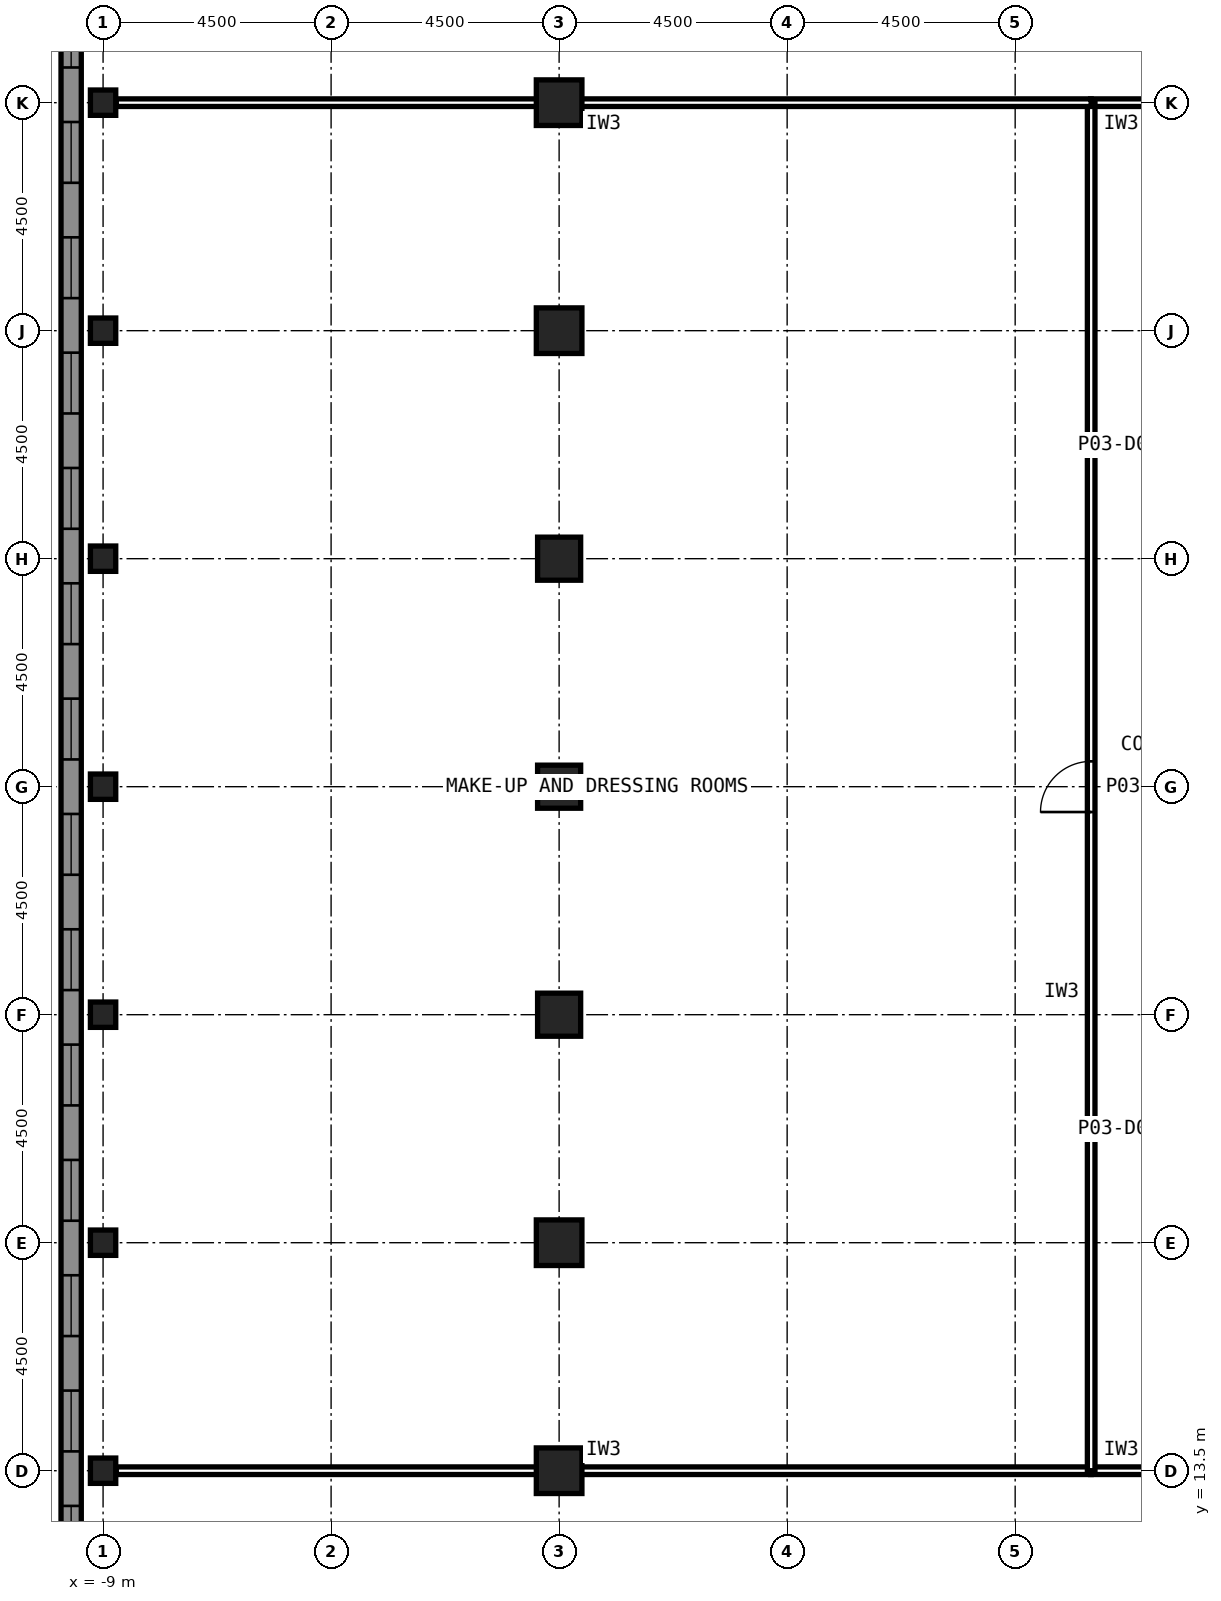
"""IFC4 building model, lengths in metres.
Left out: names, types, materials, properties, quantities, classifications, styles, units other than length and angle.
Written with IfcOpenShell. Run it as: python <this file> out.ifc"""

import sys

from ifc_helpers import new_model, si_unit, direction, frame, frame_2d, origin, origin_2d, place, context, subcontext, project, spatial, rectangle, hollow_rectangle, extrude, element, fill, save


model = new_model("IFC4")
c1 = context("Model", 3, precision=1e-05, world=origin(), true_north=direction((0.0, 1.0)))
c2 = subcontext(c1, "Body", "Model", "MODEL_VIEW")
j1 = project(units=[si_unit("LENGTHUNIT", "METRE"), si_unit("PLANEANGLEUNIT", "RADIAN")], contexts=[c1])
p1 = place(None, origin())
s1 = spatial("IfcSite", under=j1, at=p1, CompositionType="ELEMENT")
p2 = place(p1, origin())
s2 = spatial("IfcBuilding", under=s1, at=p2, CompositionType="ELEMENT")
p3 = place(p2, frame((0.0, 0.0, 12.0)))
s3 = spatial("IfcBuildingStorey", under=s2, at=p3, CompositionType="ELEMENT", Elevation=12.0)
for number, where, z_axis, x_axis in (
    (1, (0.0, 40.5, 0.0), (0.0, 0.0, 1.0), (1.0, 0.0, 0.0)),
    (2, (0.0, 36.0, 0.0), (0.0, 0.0, 1.0), (1.0, 0.0, 0.0)),
):
    element("IfcColumn", number, at=place(p3, frame(where, z_axis=z_axis, x_axis=x_axis)), inside=s3, PredefinedType="COLUMN", context=c2, shape_type="SweptSolid", body=[
        extrude(hollow_rectangle(XDim=0.9, YDim=0.9, WallThickness=0.063, at=origin_2d()), origin(), (0.0, 0.0, 1.0), 6.0),
    ])
for number, where, z_axis, x_axis in (
    (3, (0.0, 31.5, 0.0), (0.0, 0.0, 1.0), (1.0, 0.0, 0.0)),
    (4, (0.0, 27.0, 0.0), (0.0, 0.0, 1.0), (1.0, 0.0, 0.0)),
    (5, (0.0, 22.5, 0.0), (0.0, 0.0, 1.0), (1.0, 0.0, 0.0)),
):
    element("IfcColumn", number, at=place(p3, frame(where, z_axis=z_axis, x_axis=x_axis)), inside=s3, PredefinedType="COLUMN", context=c2, shape_type="SweptSolid", body=[
        extrude(hollow_rectangle(XDim=0.85, YDim=0.85, WallThickness=0.05, at=origin_2d()), origin(), (0.0, 0.0, 1.0), 6.0),
    ])
for number, where, z_axis, x_axis in (
    (6, (0.0, 18.0, 0.0), (0.0, 0.0, 1.0), (1.0, 0.0, 0.0)),
    (7, (0.0, 13.5, 0.0), (0.0, 0.0, 1.0), (1.0, 0.0, 0.0)),
):
    element("IfcColumn", number, at=place(p3, frame(where, z_axis=z_axis, x_axis=x_axis)), inside=s3, PredefinedType="COLUMN", context=c2, shape_type="SweptSolid", body=[
        extrude(hollow_rectangle(XDim=0.9, YDim=0.9, WallThickness=0.063, at=origin_2d()), origin(), (0.0, 0.0, 1.0), 6.0),
    ])
for number, where, z_axis, x_axis in (
    (8, (-9.0, 13.5, 0.0), (0.0, 0.0, 1.0), (1.0, 0.0, 0.0)),
    (9, (-9.0, 18.0, 0.0), (0.0, 0.0, 1.0), (1.0, 0.0, 0.0)),
    (10, (-9.0, 22.5, 0.0), (0.0, 0.0, 1.0), (1.0, 0.0, 0.0)),
    (11, (-9.0, 27.0, 0.0), (0.0, 0.0, 1.0), (1.0, 0.0, 0.0)),
    (12, (-9.0, 31.5, 0.0), (0.0, 0.0, 1.0), (1.0, 0.0, 0.0)),
    (13, (-9.0, 36.0, 0.0), (0.0, 0.0, 1.0), (1.0, 0.0, 0.0)),
    (14, (-9.0, 40.5, 0.0), (0.0, 0.0, 1.0), (1.0, 0.0, 0.0)),
):
    element("IfcColumn", number, at=place(p3, frame(where, z_axis=z_axis, x_axis=x_axis)), inside=s3, PredefinedType="COLUMN", context=c2, shape_type="SweptSolid", body=[
        extrude(hollow_rectangle(XDim=0.5, YDim=0.5, WallThickness=0.022, at=origin_2d()), origin(), (0.0, 0.0, 1.0), 6.0),
    ])
p4 = place(p3, frame((-9.63, 4.239, 0.0), z_axis=(0.0, 0.0, 1.0), x_axis=(0.0, 1.0, 0.0)))
e15 = element("IfcWall", 15, at=p4, inside=s3, PredefinedType="SOLIDWALL", context=c2, shape_type="SweptSolid", body=[
    extrude(rectangle(XDim=45.522, YDim=0.4, at=frame_2d((22.761, 0.0))), origin(), (0.0, 0.0, 1.0), 6.0),
])
p5 = place(p4, frame((0.538, 0.0, 0.9)))
e16 = element("IfcOpeningElement", 16, at=p5, cuts=e15, PredefinedType="OPENING", context=c2, shape_type="SweptSolid", body=[
    extrude(rectangle(XDim=1.2, YDim=1.5, at=frame_2d((0.6, 0.75))), frame((0.0, 0.21, 0.0), z_axis=(0.0, -1.0, 0.0), x_axis=(1.0, 0.0, 0.0)), (0.0, 0.0, 1.0), 0.42),
])
p6 = place(p4, frame((2.814, 0.0, 0.9)))
e17 = element("IfcOpeningElement", 17, at=p6, cuts=e15, PredefinedType="OPENING", context=c2, shape_type="SweptSolid", body=[
    extrude(rectangle(XDim=1.2, YDim=1.5, at=frame_2d((0.6, 0.75))), frame((0.0, 0.21, 0.0), z_axis=(0.0, -1.0, 0.0), x_axis=(1.0, 0.0, 0.0)), (0.0, 0.0, 1.0), 0.42),
])
p7 = place(p4, frame((5.09, 0.0, 0.9)))
e18 = element("IfcOpeningElement", 18, at=p7, cuts=e15, PredefinedType="OPENING", context=c2, shape_type="SweptSolid", body=[
    extrude(rectangle(XDim=1.2, YDim=1.5, at=frame_2d((0.6, 0.75))), frame((0.0, 0.21, 0.0), z_axis=(0.0, -1.0, 0.0), x_axis=(1.0, 0.0, 0.0)), (0.0, 0.0, 1.0), 0.42),
])
p8 = place(p4, frame((7.366, 0.0, 0.9)))
e19 = element("IfcOpeningElement", 19, at=p8, cuts=e15, PredefinedType="OPENING", context=c2, shape_type="SweptSolid", body=[
    extrude(rectangle(XDim=1.2, YDim=1.5, at=frame_2d((0.6, 0.75))), frame((0.0, 0.21, 0.0), z_axis=(0.0, -1.0, 0.0), x_axis=(1.0, 0.0, 0.0)), (0.0, 0.0, 1.0), 0.42),
])
p9 = place(p4, frame((9.642, 0.0, 0.9)))
e20 = element("IfcOpeningElement", 20, at=p9, cuts=e15, PredefinedType="OPENING", context=c2, shape_type="SweptSolid", body=[
    extrude(rectangle(XDim=1.2, YDim=1.5, at=frame_2d((0.6, 0.75))), frame((0.0, 0.21, 0.0), z_axis=(0.0, -1.0, 0.0), x_axis=(1.0, 0.0, 0.0)), (0.0, 0.0, 1.0), 0.42),
])
p10 = place(p4, frame((11.918, 0.0, 0.9)))
e21 = element("IfcOpeningElement", 21, at=p10, cuts=e15, PredefinedType="OPENING", context=c2, shape_type="SweptSolid", body=[
    extrude(rectangle(XDim=1.2, YDim=1.5, at=frame_2d((0.6, 0.75))), frame((0.0, 0.21, 0.0), z_axis=(0.0, -1.0, 0.0), x_axis=(1.0, 0.0, 0.0)), (0.0, 0.0, 1.0), 0.42),
])
p11 = place(p4, frame((14.195, 0.0, 0.9)))
e22 = element("IfcOpeningElement", 22, at=p11, cuts=e15, PredefinedType="OPENING", context=c2, shape_type="SweptSolid", body=[
    extrude(rectangle(XDim=1.2, YDim=1.5, at=frame_2d((0.6, 0.75))), frame((0.0, 0.21, 0.0), z_axis=(0.0, -1.0, 0.0), x_axis=(1.0, 0.0, 0.0)), (0.0, 0.0, 1.0), 0.42),
])
p12 = place(p4, frame((16.471, 0.0, 0.9)))
e23 = element("IfcOpeningElement", 23, at=p12, cuts=e15, PredefinedType="OPENING", context=c2, shape_type="SweptSolid", body=[
    extrude(rectangle(XDim=1.2, YDim=1.5, at=frame_2d((0.6, 0.75))), frame((0.0, 0.21, 0.0), z_axis=(0.0, -1.0, 0.0), x_axis=(1.0, 0.0, 0.0)), (0.0, 0.0, 1.0), 0.42),
])
p13 = place(p4, frame((18.747, 0.0, 0.9)))
e24 = element("IfcOpeningElement", 24, at=p13, cuts=e15, PredefinedType="OPENING", context=c2, shape_type="SweptSolid", body=[
    extrude(rectangle(XDim=1.2, YDim=1.5, at=frame_2d((0.6, 0.75))), frame((0.0, 0.21, 0.0), z_axis=(0.0, -1.0, 0.0), x_axis=(1.0, 0.0, 0.0)), (0.0, 0.0, 1.0), 0.42),
])
p14 = place(p4, frame((21.023, 0.0, 0.9)))
e25 = element("IfcOpeningElement", 25, at=p14, cuts=e15, PredefinedType="OPENING", context=c2, shape_type="SweptSolid", body=[
    extrude(rectangle(XDim=1.2, YDim=1.5, at=frame_2d((0.6, 0.75))), frame((0.0, 0.21, 0.0), z_axis=(0.0, -1.0, 0.0), x_axis=(1.0, 0.0, 0.0)), (0.0, 0.0, 1.0), 0.42),
])
p15 = place(p4, frame((23.299, 0.0, 0.9)))
e26 = element("IfcOpeningElement", 26, at=p15, cuts=e15, PredefinedType="OPENING", context=c2, shape_type="SweptSolid", body=[
    extrude(rectangle(XDim=1.2, YDim=1.5, at=frame_2d((0.6, 0.75))), frame((0.0, 0.21, 0.0), z_axis=(0.0, -1.0, 0.0), x_axis=(1.0, 0.0, 0.0)), (0.0, 0.0, 1.0), 0.42),
])
p16 = place(p4, frame((25.575, 0.0, 0.9)))
e27 = element("IfcOpeningElement", 27, at=p16, cuts=e15, PredefinedType="OPENING", context=c2, shape_type="SweptSolid", body=[
    extrude(rectangle(XDim=1.2, YDim=1.5, at=frame_2d((0.6, 0.75))), frame((0.0, 0.21, 0.0), z_axis=(0.0, -1.0, 0.0), x_axis=(1.0, 0.0, 0.0)), (0.0, 0.0, 1.0), 0.42),
])
p17 = place(p4, frame((27.851, 0.0, 0.9)))
e28 = element("IfcOpeningElement", 28, at=p17, cuts=e15, PredefinedType="OPENING", context=c2, shape_type="SweptSolid", body=[
    extrude(rectangle(XDim=1.2, YDim=1.5, at=frame_2d((0.6, 0.75))), frame((0.0, 0.21, 0.0), z_axis=(0.0, -1.0, 0.0), x_axis=(1.0, 0.0, 0.0)), (0.0, 0.0, 1.0), 0.42),
])
p18 = place(p4, frame((30.127, 0.0, 0.9)))
e29 = element("IfcOpeningElement", 29, at=p18, cuts=e15, PredefinedType="OPENING", context=c2, shape_type="SweptSolid", body=[
    extrude(rectangle(XDim=1.2, YDim=1.5, at=frame_2d((0.6, 0.75))), frame((0.0, 0.21, 0.0), z_axis=(0.0, -1.0, 0.0), x_axis=(1.0, 0.0, 0.0)), (0.0, 0.0, 1.0), 0.42),
])
p19 = place(p4, frame((32.404, 0.0, 0.9)))
e30 = element("IfcOpeningElement", 30, at=p19, cuts=e15, PredefinedType="OPENING", context=c2, shape_type="SweptSolid", body=[
    extrude(rectangle(XDim=1.2, YDim=1.5, at=frame_2d((0.6, 0.75))), frame((0.0, 0.21, 0.0), z_axis=(0.0, -1.0, 0.0), x_axis=(1.0, 0.0, 0.0)), (0.0, 0.0, 1.0), 0.42),
])
p20 = place(p4, frame((34.679, 0.0, 0.9)))
e31 = element("IfcOpeningElement", 31, at=p20, cuts=e15, PredefinedType="OPENING", context=c2, shape_type="SweptSolid", body=[
    extrude(rectangle(XDim=1.2, YDim=1.5, at=frame_2d((0.6, 0.75))), frame((0.0, 0.21, 0.0), z_axis=(0.0, -1.0, 0.0), x_axis=(1.0, 0.0, 0.0)), (0.0, 0.0, 1.0), 0.42),
])
p21 = place(p4, frame((36.956, 0.0, 0.9)))
e32 = element("IfcOpeningElement", 32, at=p21, cuts=e15, PredefinedType="OPENING", context=c2, shape_type="SweptSolid", body=[
    extrude(rectangle(XDim=1.2, YDim=1.5, at=frame_2d((0.6, 0.75))), frame((0.0, 0.21, 0.0), z_axis=(0.0, -1.0, 0.0), x_axis=(1.0, 0.0, 0.0)), (0.0, 0.0, 1.0), 0.42),
])
p22 = place(p4, frame((39.232, 0.0, 0.9)))
e33 = element("IfcOpeningElement", 33, at=p22, cuts=e15, PredefinedType="OPENING", context=c2, shape_type="SweptSolid", body=[
    extrude(rectangle(XDim=1.2, YDim=1.5, at=frame_2d((0.6, 0.75))), frame((0.0, 0.21, 0.0), z_axis=(0.0, -1.0, 0.0), x_axis=(1.0, 0.0, 0.0)), (0.0, 0.0, 1.0), 0.42),
])
p23 = place(p4, frame((41.508, 0.0, 0.9)))
e34 = element("IfcOpeningElement", 34, at=p23, cuts=e15, PredefinedType="OPENING", context=c2, shape_type="SweptSolid", body=[
    extrude(rectangle(XDim=1.2, YDim=1.5, at=frame_2d((0.6, 0.75))), frame((0.0, 0.21, 0.0), z_axis=(0.0, -1.0, 0.0), x_axis=(1.0, 0.0, 0.0)), (0.0, 0.0, 1.0), 0.42),
])
p24 = place(p4, frame((43.784, 0.0, 0.9)))
e35 = element("IfcOpeningElement", 35, at=p24, cuts=e15, PredefinedType="OPENING", context=c2, shape_type="SweptSolid", body=[
    extrude(rectangle(XDim=1.2, YDim=1.5, at=frame_2d((0.6, 0.75))), frame((0.0, 0.21, 0.0), z_axis=(0.0, -1.0, 0.0), x_axis=(1.0, 0.0, 0.0)), (0.0, 0.0, 1.0), 0.42),
])
for number, where, z_axis, x_axis in (
    (36, (10.49, 13.5, 0.0), (0.0, 0.0, 1.0), (1.0, 0.0, 0.0)),
    (37, (11.7, 40.5, 0.0), (0.0, 0.0, 1.0), (-1.0, 0.0, 0.0)),
):
    element("IfcWall", number, at=place(p3, frame(where, z_axis=z_axis, x_axis=x_axis)), inside=s3, PredefinedType="PARTITIONING", context=c2, shape_type="SweptSolid", body=[
        extrude(rectangle(XDim=1.21, YDim=0.15, at=frame_2d((0.605, 0.0))), origin(), (0.0, 0.0, 1.0), 4.949),
    ])
p25 = place(p3, frame((-8.74, 13.5, 0.0), z_axis=(0.0, 0.0, 1.0), x_axis=(1.0, 0.0, 0.0)))
e38 = element("IfcWall", 38, at=p25, inside=s3, PredefinedType="PARTITIONING", context=c2, shape_type="SweptSolid", body=[
    extrude(rectangle(XDim=19.24, YDim=0.15, at=frame_2d((9.62, 0.0))), origin(), (0.0, 0.0, 1.0), 4.949),
])
p26 = place(p3, frame((10.5, 13.5, 0.0), z_axis=(0.0, 0.0, 1.0), x_axis=(0.0, 1.0, 0.0)))
e39 = element("IfcWall", 39, at=p26, inside=s3, PredefinedType="PARTITIONING", context=c2, shape_type="SweptSolid", body=[
    extrude(rectangle(XDim=27.0, YDim=0.15, at=frame_2d((13.5, 0.0))), origin(), (0.0, 0.0, 1.0), 5.8),
])
p27 = place(p26, frame((13.0, 0.0, 0.0)))
e40 = element("IfcOpeningElement", 40, at=p27, cuts=e39, PredefinedType="OPENING", context=c2, shape_type="SweptSolid", body=[
    extrude(rectangle(XDim=1.0, YDim=2.1, at=frame_2d((0.5, 1.05))), frame((0.0, 0.085, 0.0), z_axis=(0.0, -1.0, 0.0), x_axis=(1.0, 0.0, 0.0)), (0.0, 0.0, 1.0), 0.17),
])
p28 = place(p3, frame((10.5, 40.5, 0.0), z_axis=(0.0, 0.0, 1.0), x_axis=(-1.0, 0.0, 0.0)))
e41 = element("IfcWall", 41, at=p28, inside=s3, PredefinedType="PARTITIONING", context=c2, shape_type="SweptSolid", body=[
    extrude(rectangle(XDim=19.24, YDim=0.15, at=frame_2d((9.62, 0.0))), origin(), (0.0, 0.0, 1.0), 4.949),
])
p29 = place(p8, origin())
e42 = element("IfcWindow", 42, at=p29, inside=s3, PartitioningType="SINGLE_PANEL", PredefinedType="WINDOW", context=c2, shape_type="SweptSolid", body=[
    extrude(rectangle(XDim=1.2, YDim=1.5, at=frame_2d((0.6, 0.75))), frame((0.0, 0.03, 0.0), z_axis=(0.0, -1.0, 0.0), x_axis=(1.0, 0.0, 0.0)), (0.0, 0.0, 1.0), 0.06),
])
fill(e19, e42)
p30 = place(p9, origin())
e43 = element("IfcWindow", 43, at=p30, inside=s3, PartitioningType="SINGLE_PANEL", PredefinedType="WINDOW", context=c2, shape_type="SweptSolid", body=[
    extrude(rectangle(XDim=1.2, YDim=1.5, at=frame_2d((0.6, 0.75))), frame((0.0, 0.03, 0.0), z_axis=(0.0, -1.0, 0.0), x_axis=(1.0, 0.0, 0.0)), (0.0, 0.0, 1.0), 0.06),
])
fill(e20, e43)
p31 = place(p10, origin())
e44 = element("IfcWindow", 44, at=p31, inside=s3, PartitioningType="SINGLE_PANEL", PredefinedType="WINDOW", context=c2, shape_type="SweptSolid", body=[
    extrude(rectangle(XDim=1.2, YDim=1.5, at=frame_2d((0.6, 0.75))), frame((0.0, 0.03, 0.0), z_axis=(0.0, -1.0, 0.0), x_axis=(1.0, 0.0, 0.0)), (0.0, 0.0, 1.0), 0.06),
])
fill(e21, e44)
p32 = place(p11, origin())
e45 = element("IfcWindow", 45, at=p32, inside=s3, PartitioningType="SINGLE_PANEL", PredefinedType="WINDOW", context=c2, shape_type="SweptSolid", body=[
    extrude(rectangle(XDim=1.2, YDim=1.5, at=frame_2d((0.6, 0.75))), frame((0.0, 0.03, 0.0), z_axis=(0.0, -1.0, 0.0), x_axis=(1.0, 0.0, 0.0)), (0.0, 0.0, 1.0), 0.06),
])
fill(e22, e45)
p33 = place(p12, origin())
e46 = element("IfcWindow", 46, at=p33, inside=s3, PartitioningType="SINGLE_PANEL", PredefinedType="WINDOW", context=c2, shape_type="SweptSolid", body=[
    extrude(rectangle(XDim=1.2, YDim=1.5, at=frame_2d((0.6, 0.75))), frame((0.0, 0.03, 0.0), z_axis=(0.0, -1.0, 0.0), x_axis=(1.0, 0.0, 0.0)), (0.0, 0.0, 1.0), 0.06),
])
fill(e23, e46)
p34 = place(p13, origin())
e47 = element("IfcWindow", 47, at=p34, inside=s3, PartitioningType="SINGLE_PANEL", PredefinedType="WINDOW", context=c2, shape_type="SweptSolid", body=[
    extrude(rectangle(XDim=1.2, YDim=1.5, at=frame_2d((0.6, 0.75))), frame((0.0, 0.03, 0.0), z_axis=(0.0, -1.0, 0.0), x_axis=(1.0, 0.0, 0.0)), (0.0, 0.0, 1.0), 0.06),
])
fill(e24, e47)
p35 = place(p14, origin())
e48 = element("IfcWindow", 48, at=p35, inside=s3, PartitioningType="SINGLE_PANEL", PredefinedType="WINDOW", context=c2, shape_type="SweptSolid", body=[
    extrude(rectangle(XDim=1.2, YDim=1.5, at=frame_2d((0.6, 0.75))), frame((0.0, 0.03, 0.0), z_axis=(0.0, -1.0, 0.0), x_axis=(1.0, 0.0, 0.0)), (0.0, 0.0, 1.0), 0.06),
])
fill(e25, e48)
p36 = place(p15, origin())
e49 = element("IfcWindow", 49, at=p36, inside=s3, PartitioningType="SINGLE_PANEL", PredefinedType="WINDOW", context=c2, shape_type="SweptSolid", body=[
    extrude(rectangle(XDim=1.2, YDim=1.5, at=frame_2d((0.6, 0.75))), frame((0.0, 0.03, 0.0), z_axis=(0.0, -1.0, 0.0), x_axis=(1.0, 0.0, 0.0)), (0.0, 0.0, 1.0), 0.06),
])
fill(e26, e49)
p37 = place(p16, origin())
e50 = element("IfcWindow", 50, at=p37, inside=s3, PartitioningType="SINGLE_PANEL", PredefinedType="WINDOW", context=c2, shape_type="SweptSolid", body=[
    extrude(rectangle(XDim=1.2, YDim=1.5, at=frame_2d((0.6, 0.75))), frame((0.0, 0.03, 0.0), z_axis=(0.0, -1.0, 0.0), x_axis=(1.0, 0.0, 0.0)), (0.0, 0.0, 1.0), 0.06),
])
fill(e27, e50)
p38 = place(p17, origin())
e51 = element("IfcWindow", 51, at=p38, inside=s3, PartitioningType="SINGLE_PANEL", PredefinedType="WINDOW", context=c2, shape_type="SweptSolid", body=[
    extrude(rectangle(XDim=1.2, YDim=1.5, at=frame_2d((0.6, 0.75))), frame((0.0, 0.03, 0.0), z_axis=(0.0, -1.0, 0.0), x_axis=(1.0, 0.0, 0.0)), (0.0, 0.0, 1.0), 0.06),
])
fill(e28, e51)
p39 = place(p18, origin())
e52 = element("IfcWindow", 52, at=p39, inside=s3, PartitioningType="SINGLE_PANEL", PredefinedType="WINDOW", context=c2, shape_type="SweptSolid", body=[
    extrude(rectangle(XDim=1.2, YDim=1.5, at=frame_2d((0.6, 0.75))), frame((0.0, 0.03, 0.0), z_axis=(0.0, -1.0, 0.0), x_axis=(1.0, 0.0, 0.0)), (0.0, 0.0, 1.0), 0.06),
])
fill(e29, e52)
p40 = place(p19, origin())
e53 = element("IfcWindow", 53, at=p40, inside=s3, PartitioningType="SINGLE_PANEL", PredefinedType="WINDOW", context=c2, shape_type="SweptSolid", body=[
    extrude(rectangle(XDim=1.2, YDim=1.5, at=frame_2d((0.6, 0.75))), frame((0.0, 0.03, 0.0), z_axis=(0.0, -1.0, 0.0), x_axis=(1.0, 0.0, 0.0)), (0.0, 0.0, 1.0), 0.06),
])
fill(e30, e53)
p41 = place(p20, origin())
e54 = element("IfcWindow", 54, at=p41, inside=s3, PartitioningType="SINGLE_PANEL", PredefinedType="WINDOW", context=c2, shape_type="SweptSolid", body=[
    extrude(rectangle(XDim=1.2, YDim=1.5, at=frame_2d((0.6, 0.75))), frame((0.0, 0.03, 0.0), z_axis=(0.0, -1.0, 0.0), x_axis=(1.0, 0.0, 0.0)), (0.0, 0.0, 1.0), 0.06),
])
fill(e31, e54)
p42 = place(p21, origin())
e55 = element("IfcWindow", 55, at=p42, inside=s3, PartitioningType="SINGLE_PANEL", PredefinedType="WINDOW", context=c2, shape_type="SweptSolid", body=[
    extrude(rectangle(XDim=1.2, YDim=1.5, at=frame_2d((0.6, 0.75))), frame((0.0, 0.03, 0.0), z_axis=(0.0, -1.0, 0.0), x_axis=(1.0, 0.0, 0.0)), (0.0, 0.0, 1.0), 0.06),
])
fill(e32, e55)
p43 = place(p27, origin())
e56 = element("IfcDoor", 56, at=p43, inside=s3, OperationType="SINGLE_SWING_LEFT", PredefinedType="DOOR", context=c2, shape_type="SweptSolid", body=[
    extrude(rectangle(XDim=1.0, YDim=2.1, at=frame_2d((0.5, 1.05))), frame((0.0, 0.025, 0.0), z_axis=(0.0, -1.0, 0.0), x_axis=(1.0, 0.0, 0.0)), (0.0, 0.0, 1.0), 0.05),
])
fill(e40, e56)
save(model, sys.argv[1])
